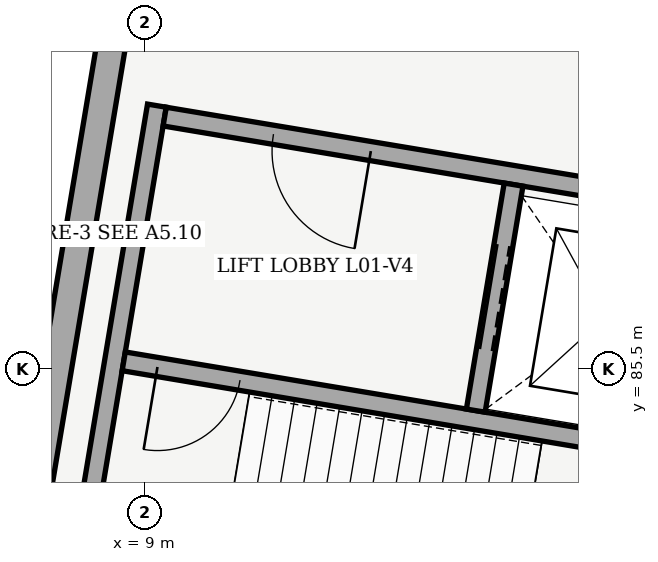
"""IFC4 building model, lengths in metres.
Left out: names, types, materials, properties, quantities, classifications, styles, units other than length and angle.
Written with IfcOpenShell. Run it as: python <this file> out.ifc"""

import sys

from ifc_helpers import new_model, si_unit, direction, frame, frame_2d, origin, origin_with_axes, place, context, subcontext, project, spatial, rectangle, extrude, element, fill, save


model = new_model("IFC4")
c1 = context("Model", 3, precision=1e-05, world=origin(), true_north=direction((0.0, 1.0)))
c2 = subcontext(c1, "Body", "Model", "MODEL_VIEW")
j1 = project(units=[si_unit("LENGTHUNIT", "METRE"), si_unit("PLANEANGLEUNIT", "RADIAN")], contexts=[c1])
p1 = place(None, origin())
s1 = spatial("IfcSite", under=j1, at=p1, CompositionType="ELEMENT")
p2 = place(p1, origin())
s2 = spatial("IfcBuilding", under=s1, at=p2, CompositionType="ELEMENT")
p3 = place(p2, frame((0.0, 0.0, 4.8)))
s3 = spatial("IfcBuildingStorey", under=s2, at=p3, CompositionType="ELEMENT", Elevation=4.8)
p4 = place(p3, frame((7.098, 81.049, 0.0), z_axis=(0.0, 0.0, 1.0), x_axis=(0.165070646291, 0.986281745615, 0.0)))
e1 = element("IfcWall", 1, at=p4, inside=s3, PredefinedType="SOLIDWALL", context=c2, shape_type="SweptSolid", body=[
    extrude(rectangle(XDim=9.136, YDim=0.38, at=frame_2d((4.568, 0.0))), origin(), (0.0, 0.0, 1.0), 3.4),
])
p5 = place(p3, frame((7.856, 81.184, 0.0), z_axis=(0.0, 0.0, 1.0), x_axis=(0.165031598329, 0.986288280146, 0.0)))
e2 = element("IfcWall", 2, at=p5, inside=s3, PredefinedType="SHEAR", context=c2, shape_type="SweptSolid", body=[
    extrude(rectangle(XDim=7.885, YDim=0.25, at=frame_2d((3.942, 0.0))), origin(), (0.0, 0.0, 1.0), 4.54),
])
p6 = place(p3, frame((16.167, 84.351, 0.0), z_axis=(0.0, 0.0, 1.0), x_axis=(-0.986286216974, 0.165043928115, 0.0)))
e3 = element("IfcWall", 3, at=p6, inside=s3, PredefinedType="SHEAR", context=c2, shape_type="SweptSolid", body=[
    extrude(rectangle(XDim=7.55, YDim=0.25, at=frame_2d((3.775, 0.0))), origin(), (0.0, 0.0, 1.0), 4.54),
])
p7 = place(p6, frame((6.0, 0.0, 0.0)))
e4 = element("IfcOpeningElement", 4, at=p7, cuts=e3, PredefinedType="OPENING", context=c2, shape_type="SweptSolid", body=[
    extrude(rectangle(XDim=1.1, YDim=2.15, at=frame_2d((0.55, 1.075))), frame((0.0, 0.135, 0.0), z_axis=(0.0, -1.0, 0.0), x_axis=(1.0, 0.0, 0.0)), (0.0, 0.0, 1.0), 0.27),
])
p8 = place(p3, frame((16.706, 87.571, 0.0), z_axis=(0.0, 0.0, 1.0), x_axis=(-0.98628533611, 0.165049191984, 0.0)))
e5 = element("IfcWall", 5, at=p8, inside=s3, PredefinedType="SHEAR", context=c2, shape_type="SweptSolid", body=[
    extrude(rectangle(XDim=7.55, YDim=0.25, at=frame_2d((3.775, 0.0))), origin(), (0.0, 0.0, 1.0), 4.54),
])
p9 = place(p8, frame((4.8, 0.0, 0.0)))
e6 = element("IfcOpeningElement", 6, at=p9, cuts=e5, PredefinedType="OPENING", context=c2, shape_type="SweptSolid", body=[
    extrude(rectangle(XDim=1.3, YDim=2.15, at=frame_2d((0.65, 1.075))), frame((0.0, 0.135, 0.0), z_axis=(0.0, -1.0, 0.0), x_axis=(1.0, 0.0, 0.0)), (0.0, 0.0, 1.0), 0.27),
])
p10 = place(p3, frame((13.352, 84.948, 0.0), z_axis=(0.0, 0.0, 1.0), x_axis=(0.165029254052, 0.986288672401, 0.0)))
e7 = element("IfcWall", 7, at=p10, inside=s3, PredefinedType="SHEAR", context=c2, shape_type="SweptSolid", body=[
    extrude(rectangle(XDim=3.015, YDim=0.25, at=frame_2d((1.507, 0.0))), origin(), (0.0, 0.0, 1.0), 4.54),
])
p11 = place(p10, frame((0.808, 0.0, 0.0)))
e8 = element("IfcOpeningElement", 8, at=p11, cuts=e7, PredefinedType="OPENING", context=c2, shape_type="SweptSolid", body=[
    extrude(rectangle(XDim=1.4, YDim=2.15, at=frame_2d((0.7, 1.075))), frame((0.0, 0.135, 0.0), z_axis=(0.0, -1.0, 0.0), x_axis=(1.0, 0.0, 0.0)), (0.0, 0.0, 1.0), 0.27),
])
p12 = place(p3, frame((30.598, 88.187, 0.0), z_axis=(0.0, 0.0, 1.0), x_axis=(-0.986287016704, 0.165039148936, 0.0)))
e9 = element("IfcWall", 9, at=p12, inside=s3, PredefinedType="PARTITIONING", context=c2, shape_type="SweptSolid", body=[
    extrude(rectangle(XDim=21.83, YDim=0.11, at=frame_2d((10.915, 0.0))), origin(), (0.0, 0.0, 1.0), 3.38),
])
p13 = place(p12, frame((7.89, 0.0, 0.0)))
e10 = element("IfcOpeningElement", 10, at=p13, cuts=e9, PredefinedType="OPENING", context=c2, shape_type="SweptSolid", body=[
    extrude(rectangle(XDim=1.22, YDim=2.2, at=frame_2d((0.61, 1.1))), frame((0.0, 0.065, 0.0), z_axis=(0.0, -1.0, 0.0), x_axis=(1.0, 0.0, 0.0)), (0.0, 0.0, 1.0), 0.13),
])
p14 = place(p7, origin_with_axes())
e11 = element("IfcDoor", 11, at=p14, inside=s3, OperationType="SINGLE_SWING_RIGHT", PredefinedType="DOOR", context=c2, shape_type="SweptSolid", body=[
    extrude(rectangle(XDim=1.1, YDim=2.15, at=frame_2d((0.55, 1.075))), frame((0.0, 0.025, 0.0), z_axis=(0.0, -1.0, 0.0), x_axis=(1.0, 0.0, 0.0)), (0.0, 0.0, 1.0), 0.05),
])
fill(e4, e11)
p15 = place(p9, origin_with_axes())
e12 = element("IfcDoor", 12, at=p15, inside=s3, OperationType="SINGLE_SWING_LEFT", PredefinedType="DOOR", context=c2, shape_type="SweptSolid", body=[
    extrude(rectangle(XDim=1.3, YDim=2.15, at=frame_2d((0.65, 1.075))), frame((0.0, 0.025, 0.0), z_axis=(0.0, -1.0, 0.0), x_axis=(1.0, 0.0, 0.0)), (0.0, 0.0, 1.0), 0.05),
])
fill(e6, e12)
p16 = place(p11, origin_with_axes())
e13 = element("IfcDoor", 13, at=p16, inside=s3, OperationType="DOUBLE_DOOR_SLIDING", PredefinedType="DOOR", context=c2, shape_type="SweptSolid", body=[
    extrude(rectangle(XDim=1.4, YDim=2.15, at=frame_2d((0.7, 1.075))), frame((0.0, 0.025, 0.0), z_axis=(0.0, -1.0, 0.0), x_axis=(1.0, 0.0, 0.0)), (0.0, 0.0, 1.0), 0.05),
])
fill(e8, e13)
save(model, sys.argv[1])
